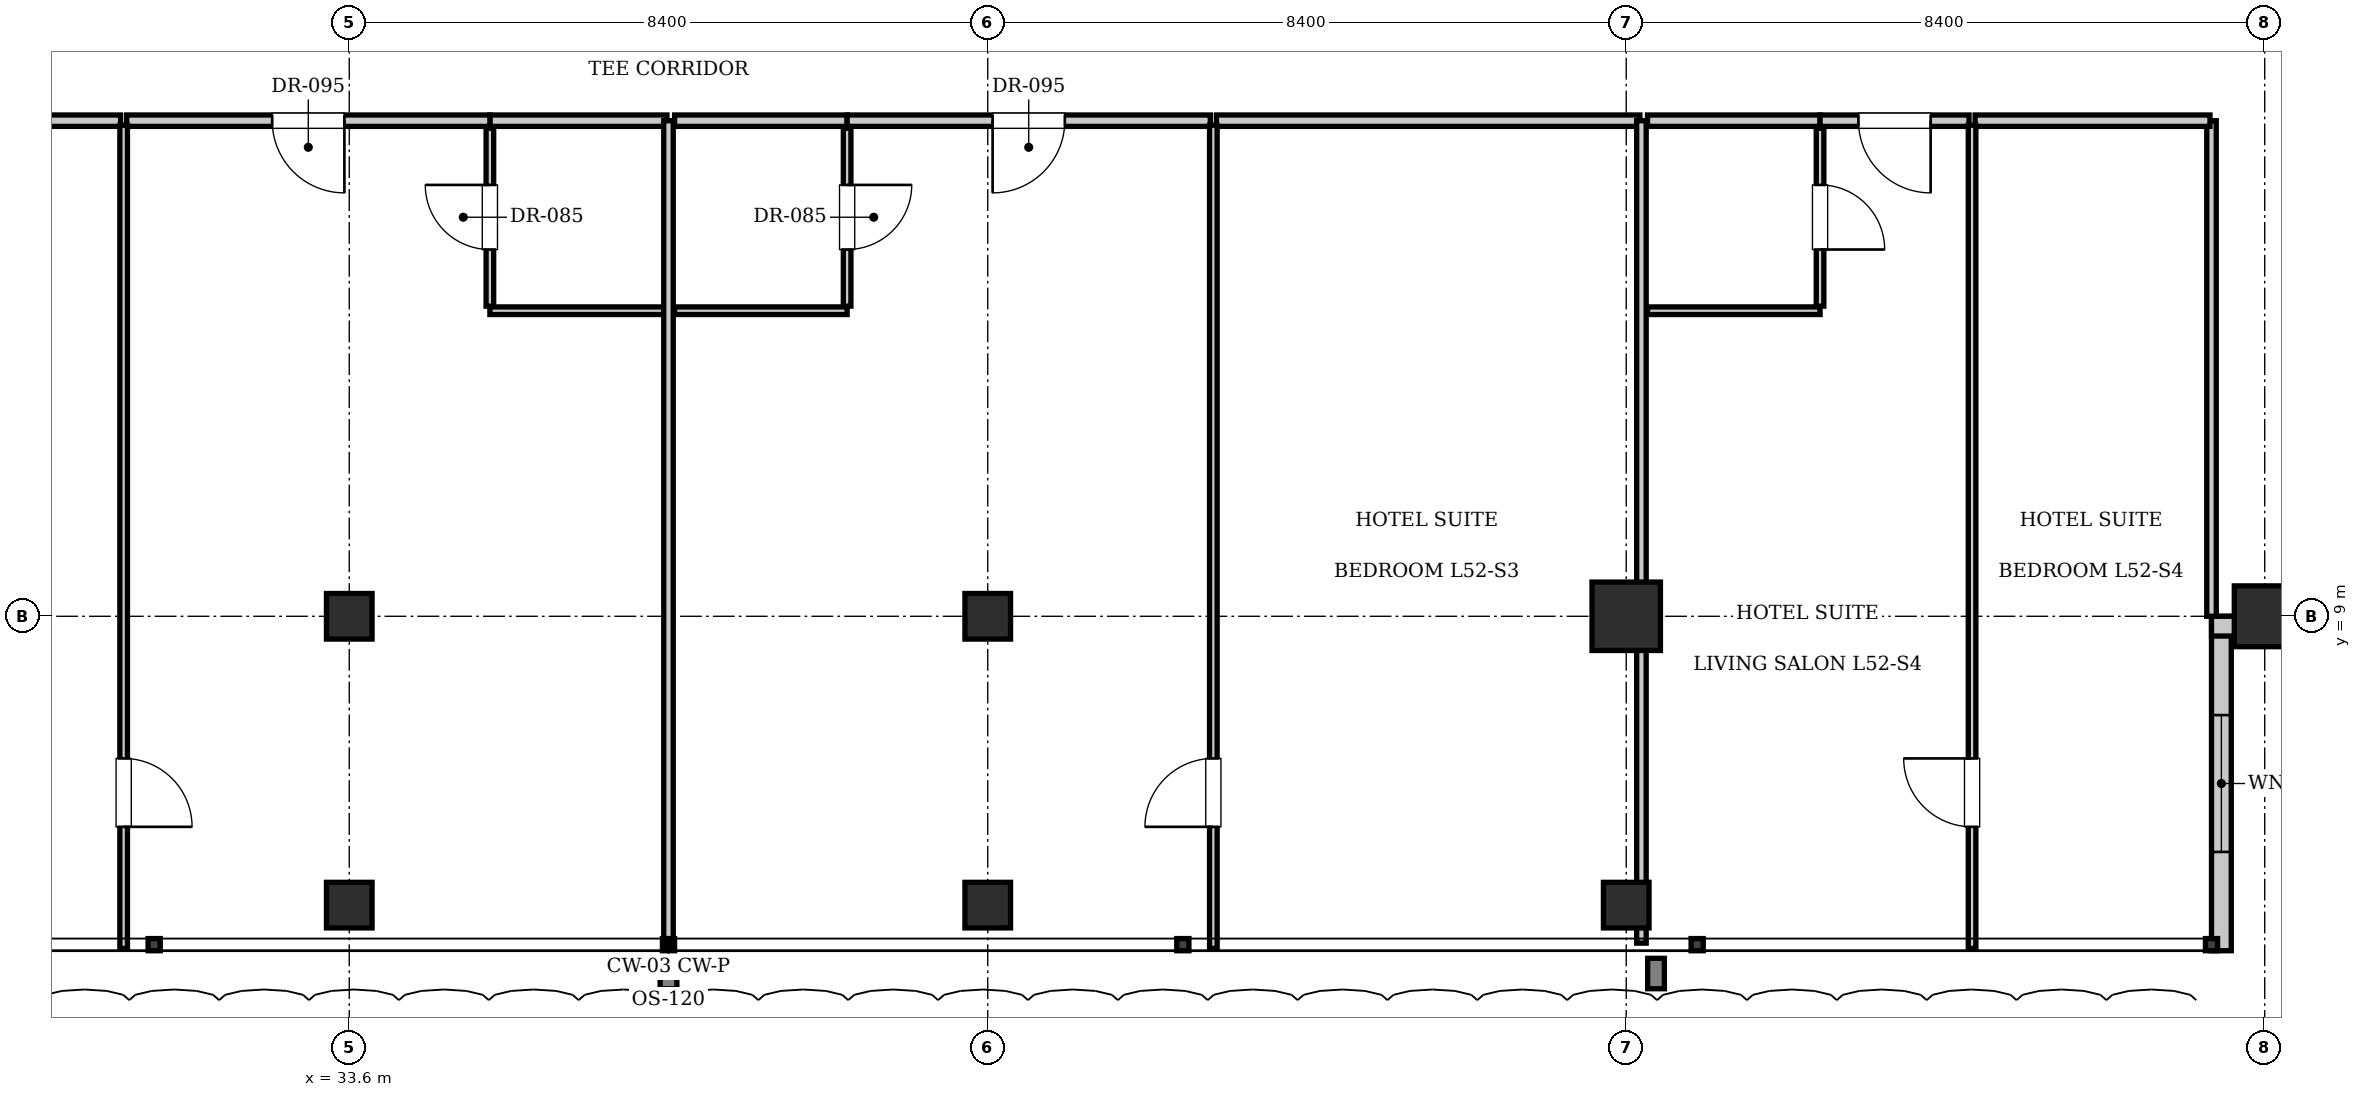
"""IFC4 building model, lengths in metres.
Left out: names, types, materials, properties, quantities, classifications, styles, units other than length and angle.
Written with IfcOpenShell. Run it as: python <this file> out.ifc"""

import sys

from ifc_helpers import new_model, si_unit, direction, frame, frame_2d, origin, origin_2d, place, context, subcontext, project, spatial, rectangle, i_section, extrude, element, fill, save


model = new_model("IFC4")
c1 = context("Model", 3, precision=1e-05, world=origin(), true_north=direction((0.0, 1.0)))
c2 = subcontext(c1, "Body", "Model", "MODEL_VIEW")
j1 = project(units=[si_unit("LENGTHUNIT", "METRE"), si_unit("PLANEANGLEUNIT", "RADIAN")], contexts=[c1])
p1 = place(None, origin())
s1 = spatial("IfcSite", under=j1, at=p1, CompositionType="ELEMENT")
p2 = place(p1, origin())
s2 = spatial("IfcBuilding", under=s1, at=p2, CompositionType="ELEMENT")
p3 = place(p2, frame((0.0, 0.0, 212.1)))
s3 = spatial("IfcBuildingStorey", under=s2, at=p3, CompositionType="ELEMENT", Elevation=212.1)
p4 = place(p3, frame((50.4, 9.0, 0.0), z_axis=(0.0, 0.0, 1.0), x_axis=(1.0, 0.0, 0.0)))
e1 = element("IfcColumn", 1, at=p4, inside=s3, PredefinedType="COLUMN", context=c2, shape_type="SweptSolid", body=[
    extrude(rectangle(XDim=0.9, YDim=0.9, at=origin_2d()), origin(), (0.0, 0.0, 1.0), 3.85),
])
for number, where, z_axis, x_axis in (
    (2, (33.6, 9.0, 0.0), (0.0, 0.0, 1.0), (1.0, 0.0, 0.0)),
    (3, (42.0, 9.0, 0.0), (0.0, 0.0, 1.0), (1.0, 0.0, 0.0)),
):
    element("IfcColumn", number, at=place(p3, frame(where, z_axis=z_axis, x_axis=x_axis)), inside=s3, PredefinedType="COLUMN", context=c2, shape_type="SweptSolid", body=[
        extrude(i_section(OverallWidth=0.6, OverallDepth=0.6, WebThickness=0.025, FlangeThickness=0.038, at=origin_2d()), origin(), (0.0, 0.0, 1.0), 3.85),
    ])
p5 = place(p3, frame((58.8, 9.0, 0.0), z_axis=(0.0, 0.0, 1.0), x_axis=(1.0, 0.0, 0.0)))
e4 = element("IfcColumn", 4, at=p5, inside=s3, PredefinedType="COLUMN", context=c2, shape_type="SweptSolid", body=[
    extrude(rectangle(XDim=0.8, YDim=0.8, at=origin_2d()), origin(), (0.0, 0.0, 1.0), 3.85),
])
for number, where, z_axis, x_axis in (
    (5, (33.6, 5.2, 0.0), (0.0, 0.0, 1.0), (1.0, 0.0, 0.0)),
    (6, (42.0, 5.2, 0.0), (0.0, 0.0, 1.0), (1.0, 0.0, 0.0)),
    (7, (50.4, 5.2, 0.0), (0.0, 0.0, 1.0), (1.0, 0.0, 0.0)),
):
    element("IfcColumn", number, at=place(p3, frame(where, z_axis=z_axis, x_axis=x_axis)), inside=s3, PredefinedType="COLUMN", context=c2, shape_type="SweptSolid", body=[
        extrude(i_section(OverallWidth=0.6, OverallDepth=0.6, WebThickness=0.025, FlangeThickness=0.038, at=origin_2d()), origin(), (0.0, 0.0, 1.0), 3.85),
    ])
p6 = place(p3, frame((58.23, 9.0, 0.0), z_axis=(0.0, 0.0, 1.0), x_axis=(0.0, -1.0, 0.0)))
e8 = element("IfcWall", 8, at=p6, inside=s3, PredefinedType="SOLIDWALL", context=c2, shape_type="SweptSolid", body=[
    extrude(rectangle(XDim=4.4, YDim=0.26, at=frame_2d((2.2, 0.0))), origin(), (0.0, 0.0, 1.0), 3.61),
])
p7 = place(p6, frame((1.3, 0.0, 0.9)))
e9 = element("IfcOpeningElement", 9, at=p7, cuts=e8, PredefinedType="OPENING", context=c2, shape_type="SweptSolid", body=[
    extrude(rectangle(XDim=1.8, YDim=2.1, at=frame_2d((0.9, 1.05))), frame((0.0, 0.14, 0.0), z_axis=(0.0, -1.0, 0.0), x_axis=(1.0, 0.0, 0.0)), (0.0, 0.0, 1.0), 0.28),
])
p8 = place(p3, frame((62.5, 8.87, 0.0), z_axis=(0.0, 0.0, 1.0), x_axis=(-1.0, 0.0, 0.0)))
e10 = element("IfcWall", 10, at=p8, inside=s3, PredefinedType="SOLIDWALL", context=c2, shape_type="SweptSolid", body=[
    extrude(rectangle(XDim=4.4, YDim=0.26, at=frame_2d((2.2, 0.0))), origin(), (0.0, 0.0, 1.0), 3.071),
])
p9 = place(p8, frame((1.3, 0.0, 0.9)))
e11 = element("IfcOpeningElement", 11, at=p9, cuts=e10, PredefinedType="OPENING", context=c2, shape_type="SweptSolid", body=[
    extrude(rectangle(XDim=1.8, YDim=2.1, at=frame_2d((0.9, 1.05))), frame((0.0, 0.14, 0.0), z_axis=(0.0, -1.0, 0.0), x_axis=(1.0, 0.0, 0.0)), (0.0, 0.0, 1.0), 0.28),
])
p10 = place(p3, frame((58.1, 9.0, 0.0), z_axis=(0.0, 0.0, 1.0), x_axis=(0.0, 1.0, 0.0)))
e12 = element("IfcWall", 12, at=p10, inside=s3, PredefinedType="PARTITIONING", context=c2, shape_type="SweptSolid", body=[
    extrude(rectangle(XDim=6.52, YDim=0.125, at=frame_2d((3.26, 0.0))), origin(), (0.0, 0.0, 1.0), 3.61),
])
p11 = place(p3, frame((35.45, 15.52, 0.0), z_axis=(0.0, 0.0, 1.0), x_axis=(1.0, 0.0, 0.0)))
e13 = element("IfcWall", 13, at=p11, inside=s3, PredefinedType="PARTITIONING", context=c2, shape_type="SweptSolid", body=[
    extrude(rectangle(XDim=2.33, YDim=0.15, at=frame_2d((1.165, 0.0))), origin(), (0.0, 0.0, 1.0), 3.61),
])
p12 = place(p3, frame((35.45, 13.02, 0.0), z_axis=(0.0, 0.0, 1.0), x_axis=(1.0, 0.0, 0.0)))
e14 = element("IfcWall", 14, at=p12, inside=s3, PredefinedType="PARTITIONING", context=c2, shape_type="SweptSolid", body=[
    extrude(rectangle(XDim=2.31, YDim=0.1, at=frame_2d((1.155, 0.0))), origin(), (0.0, 0.0, 1.0), 3.61),
])
p13 = place(p3, frame((35.45, 13.08, 0.0), z_axis=(0.0, 0.0, 1.0), x_axis=(0.0, 1.0, 0.0)))
e15 = element("IfcWall", 15, at=p13, inside=s3, PredefinedType="PARTITIONING", context=c2, shape_type="SweptSolid", body=[
    extrude(rectangle(XDim=2.34, YDim=0.1, at=frame_2d((1.17, 0.0))), origin(), (0.0, 0.0, 1.0), 3.61),
])
p14 = place(p13, frame((0.745, 0.0, 0.0)))
e16 = element("IfcOpeningElement", 16, at=p14, cuts=e15, PredefinedType="OPENING", context=c2, shape_type="SweptSolid", body=[
    extrude(rectangle(XDim=0.85, YDim=2.1, at=frame_2d((0.425, 1.05))), frame((0.0, 0.06, 0.0), z_axis=(0.0, -1.0, 0.0), x_axis=(1.0, 0.0, 0.0)), (0.0, 0.0, 1.0), 0.12),
])
p15 = place(p3, frame((25.02, 15.52, 0.0), z_axis=(0.0, 0.0, 1.0), x_axis=(1.0, 0.0, 0.0)))
e17 = element("IfcWall", 17, at=p15, inside=s3, PredefinedType="PARTITIONING", context=c2, shape_type="SweptSolid", body=[
    extrude(rectangle(XDim=5.572, YDim=0.15, at=frame_2d((2.786, 0.0))), origin(), (0.0, 0.0, 1.0), 3.61),
])
p16 = place(p3, frame((30.672, 15.52, 0.0), z_axis=(0.0, 0.0, 1.0), x_axis=(1.0, 0.0, 0.0)))
e18 = element("IfcWall", 18, at=p16, inside=s3, PredefinedType="PARTITIONING", context=c2, shape_type="SweptSolid", body=[
    extrude(rectangle(XDim=4.778, YDim=0.15, at=frame_2d((2.389, 0.0))), origin(), (0.0, 0.0, 1.0), 3.61),
])
p17 = place(p16, frame((1.914, 0.0, 0.0)))
e19 = element("IfcOpeningElement", 19, at=p17, cuts=e18, PredefinedType="OPENING", context=c2, shape_type="SweptSolid", body=[
    extrude(rectangle(XDim=0.95, YDim=2.15, at=frame_2d((0.475, 1.075))), frame((0.0, 0.085, 0.0), z_axis=(0.0, -1.0, 0.0), x_axis=(1.0, 0.0, 0.0)), (0.0, 0.0, 1.0), 0.17),
])
p18 = place(p3, frame((30.632, 4.63, 0.0), z_axis=(0.0, 0.0, 1.0), x_axis=(0.0, 1.0, 0.0)))
e20 = element("IfcWall", 20, at=p18, inside=s3, PredefinedType="PARTITIONING", context=c2, shape_type="SweptSolid", body=[
    extrude(rectangle(XDim=10.83, YDim=0.1, at=frame_2d((5.415, 0.0))), origin(), (0.0, 0.0, 1.0), 3.61),
])
p19 = place(p18, frame((1.6, 0.0, 0.0)))
e21 = element("IfcOpeningElement", 21, at=p19, cuts=e20, PredefinedType="OPENING", context=c2, shape_type="SweptSolid", body=[
    extrude(rectangle(XDim=0.9, YDim=2.1, at=frame_2d((0.45, 1.05))), frame((0.0, 0.06, 0.0), z_axis=(0.0, -1.0, 0.0), x_axis=(1.0, 0.0, 0.0)), (0.0, 0.0, 1.0), 0.12),
])
p20 = place(p3, frame((37.8, 4.7, 0.0), z_axis=(0.0, 0.0, 1.0), x_axis=(0.0, 1.0, 0.0)))
e22 = element("IfcWall", 22, at=p20, inside=s3, PredefinedType="PARTITIONING", context=c2, shape_type="SweptSolid", body=[
    extrude(rectangle(XDim=10.82, YDim=0.125, at=frame_2d((5.41, 0.0))), origin(), (0.0, 0.0, 1.0), 3.207),
])
p21 = place(p3, frame((37.88, 15.52, 0.0), z_axis=(0.0, 0.0, 1.0), x_axis=(1.0, 0.0, 0.0)))
e23 = element("IfcWall", 23, at=p21, inside=s3, PredefinedType="PARTITIONING", context=c2, shape_type="SweptSolid", body=[
    extrude(rectangle(XDim=2.27, YDim=0.15, at=frame_2d((1.135, 0.0))), origin(), (0.0, 0.0, 1.0), 3.61),
])
p22 = place(p3, frame((37.88, 13.02, 0.0), z_axis=(0.0, 0.0, 1.0), x_axis=(1.0, 0.0, 0.0)))
e24 = element("IfcWall", 24, at=p22, inside=s3, PredefinedType="PARTITIONING", context=c2, shape_type="SweptSolid", body=[
    extrude(rectangle(XDim=2.27, YDim=0.1, at=frame_2d((1.135, 0.0))), origin(), (0.0, 0.0, 1.0), 3.61),
])
p23 = place(p3, frame((40.15, 13.08, 0.0), z_axis=(0.0, 0.0, 1.0), x_axis=(0.0, 1.0, 0.0)))
e25 = element("IfcWall", 25, at=p23, inside=s3, PredefinedType="PARTITIONING", context=c2, shape_type="SweptSolid", body=[
    extrude(rectangle(XDim=2.34, YDim=0.1, at=frame_2d((1.17, 0.0))), origin(), (0.0, 0.0, 1.0), 3.61),
])
p24 = place(p23, frame((0.745, 0.0, 0.0)))
e26 = element("IfcOpeningElement", 26, at=p24, cuts=e25, PredefinedType="OPENING", context=c2, shape_type="SweptSolid", body=[
    extrude(rectangle(XDim=0.85, YDim=2.1, at=frame_2d((0.425, 1.05))), frame((0.0, 0.06, 0.0), z_axis=(0.0, -1.0, 0.0), x_axis=(1.0, 0.0, 0.0)), (0.0, 0.0, 1.0), 0.12),
])
p25 = place(p3, frame((40.15, 15.52, 0.0), z_axis=(0.0, 0.0, 1.0), x_axis=(1.0, 0.0, 0.0)))
e27 = element("IfcWall", 27, at=p25, inside=s3, PredefinedType="PARTITIONING", context=c2, shape_type="SweptSolid", body=[
    extrude(rectangle(XDim=4.778, YDim=0.15, at=frame_2d((2.389, 0.0))), origin(), (0.0, 0.0, 1.0), 3.61),
])
p26 = place(p25, frame((1.914, 0.0, 0.0)))
e28 = element("IfcOpeningElement", 28, at=p26, cuts=e27, PredefinedType="OPENING", context=c2, shape_type="SweptSolid", body=[
    extrude(rectangle(XDim=0.95, YDim=2.15, at=frame_2d((0.475, 1.075))), frame((0.0, 0.085, 0.0), z_axis=(0.0, -1.0, 0.0), x_axis=(1.0, 0.0, 0.0)), (0.0, 0.0, 1.0), 0.17),
])
p27 = place(p3, frame((45.008, 15.52, 0.0), z_axis=(0.0, 0.0, 1.0), x_axis=(1.0, 0.0, 0.0)))
e29 = element("IfcWall", 29, at=p27, inside=s3, PredefinedType="PARTITIONING", context=c2, shape_type="SweptSolid", body=[
    extrude(rectangle(XDim=5.572, YDim=0.15, at=frame_2d((2.786, 0.0))), origin(), (0.0, 0.0, 1.0), 3.61),
])
p28 = place(p3, frame((44.968, 4.63, 0.0), z_axis=(0.0, 0.0, 1.0), x_axis=(0.0, 1.0, 0.0)))
e30 = element("IfcWall", 30, at=p28, inside=s3, PredefinedType="PARTITIONING", context=c2, shape_type="SweptSolid", body=[
    extrude(rectangle(XDim=10.83, YDim=0.1, at=frame_2d((5.415, 0.0))), origin(), (0.0, 0.0, 1.0), 3.61),
])
p29 = place(p28, frame((1.6, 0.0, 0.0)))
e31 = element("IfcOpeningElement", 31, at=p29, cuts=e30, PredefinedType="OPENING", context=c2, shape_type="SweptSolid", body=[
    extrude(rectangle(XDim=0.9, YDim=2.1, at=frame_2d((0.45, 1.05))), frame((0.0, 0.06, 0.0), z_axis=(0.0, -1.0, 0.0), x_axis=(1.0, 0.0, 0.0)), (0.0, 0.0, 1.0), 0.12),
])
p30 = place(p3, frame((50.6, 4.7, 0.0), z_axis=(0.0, 0.0, 1.0), x_axis=(0.0, 1.0, 0.0)))
e32 = element("IfcWall", 32, at=p30, inside=s3, PredefinedType="PARTITIONING", context=c2, shape_type="SweptSolid", body=[
    extrude(rectangle(XDim=10.82, YDim=0.125, at=frame_2d((5.41, 0.0))), origin(), (0.0, 0.0, 1.0), 3.61),
])
p31 = place(p3, frame((50.68, 15.52, 0.0), z_axis=(0.0, 0.0, 1.0), x_axis=(1.0, 0.0, 0.0)))
e33 = element("IfcWall", 33, at=p31, inside=s3, PredefinedType="PARTITIONING", context=c2, shape_type="SweptSolid", body=[
    extrude(rectangle(XDim=2.27, YDim=0.15, at=frame_2d((1.135, 0.0))), origin(), (0.0, 0.0, 1.0), 3.61),
])
p32 = place(p3, frame((50.68, 13.02, 0.0), z_axis=(0.0, 0.0, 1.0), x_axis=(1.0, 0.0, 0.0)))
e34 = element("IfcWall", 34, at=p32, inside=s3, PredefinedType="PARTITIONING", context=c2, shape_type="SweptSolid", body=[
    extrude(rectangle(XDim=2.27, YDim=0.1, at=frame_2d((1.135, 0.0))), origin(), (0.0, 0.0, 1.0), 3.61),
])
p33 = place(p3, frame((52.95, 13.08, 0.0), z_axis=(0.0, 0.0, 1.0), x_axis=(0.0, 1.0, 0.0)))
e35 = element("IfcWall", 35, at=p33, inside=s3, PredefinedType="PARTITIONING", context=c2, shape_type="SweptSolid", body=[
    extrude(rectangle(XDim=2.34, YDim=0.1, at=frame_2d((1.17, 0.0))), origin(), (0.0, 0.0, 1.0), 3.61),
])
p34 = place(p33, frame((0.745, 0.0, 0.0)))
e36 = element("IfcOpeningElement", 36, at=p34, cuts=e35, PredefinedType="OPENING", context=c2, shape_type="SweptSolid", body=[
    extrude(rectangle(XDim=0.85, YDim=2.1, at=frame_2d((0.425, 1.05))), frame((0.0, 0.06, 0.0), z_axis=(0.0, -1.0, 0.0), x_axis=(1.0, 0.0, 0.0)), (0.0, 0.0, 1.0), 0.12),
])
p35 = place(p3, frame((52.95, 15.52, 0.0), z_axis=(0.0, 0.0, 1.0), x_axis=(1.0, 0.0, 0.0)))
e37 = element("IfcWall", 37, at=p35, inside=s3, PredefinedType="PARTITIONING", context=c2, shape_type="SweptSolid", body=[
    extrude(rectangle(XDim=1.96, YDim=0.15, at=frame_2d((0.98, 0.0))), origin(), (0.0, 0.0, 1.0), 3.61),
])
p36 = place(p35, frame((0.505, 0.0, 0.0)))
e38 = element("IfcOpeningElement", 38, at=p36, cuts=e37, PredefinedType="OPENING", context=c2, shape_type="SweptSolid", body=[
    extrude(rectangle(XDim=0.95, YDim=2.15, at=frame_2d((0.475, 1.075))), frame((0.0, 0.085, 0.0), z_axis=(0.0, -1.0, 0.0), x_axis=(1.0, 0.0, 0.0)), (0.0, 0.0, 1.0), 0.17),
])
p37 = place(p3, frame((54.99, 15.52, 0.0), z_axis=(0.0, 0.0, 1.0), x_axis=(1.0, 0.0, 0.0)))
e39 = element("IfcWall", 39, at=p37, inside=s3, PredefinedType="PARTITIONING", context=c2, shape_type="SweptSolid", body=[
    extrude(rectangle(XDim=3.09, YDim=0.15, at=frame_2d((1.545, 0.0))), origin(), (0.0, 0.0, 1.0), 3.61),
])
p38 = place(p3, frame((54.95, 4.63, 0.0), z_axis=(0.0, 0.0, 1.0), x_axis=(0.0, 1.0, 0.0)))
e40 = element("IfcWall", 40, at=p38, inside=s3, PredefinedType="PARTITIONING", context=c2, shape_type="SweptSolid", body=[
    extrude(rectangle(XDim=10.83, YDim=0.1, at=frame_2d((5.415, 0.0))), origin(), (0.0, 0.0, 1.0), 3.61),
])
p39 = place(p38, frame((1.6, 0.0, 0.0)))
e41 = element("IfcOpeningElement", 41, at=p39, cuts=e40, PredefinedType="OPENING", context=c2, shape_type="SweptSolid", body=[
    extrude(rectangle(XDim=0.9, YDim=2.1, at=frame_2d((0.45, 1.05))), frame((0.0, 0.06, 0.0), z_axis=(0.0, -1.0, 0.0), x_axis=(1.0, 0.0, 0.0)), (0.0, 0.0, 1.0), 0.12),
])
p40 = place(p7, origin())
e42 = element("IfcWindow", 42, at=p40, inside=s3, PartitioningType="SINGLE_PANEL", PredefinedType="WINDOW", context=c2, shape_type="SweptSolid", body=[
    extrude(rectangle(XDim=1.8, YDim=2.1, at=frame_2d((0.9, 1.05))), frame((0.0, 0.03, 0.0), z_axis=(0.0, -1.0, 0.0), x_axis=(1.0, 0.0, 0.0)), (0.0, 0.0, 1.0), 0.06),
])
fill(e9, e42)
p41 = place(p14, origin())
e43 = element("IfcDoor", 43, at=p41, inside=s3, OperationType="SINGLE_SWING_RIGHT", PredefinedType="DOOR", context=c2, shape_type="SweptSolid", body=[
    extrude(rectangle(XDim=0.85, YDim=2.1, at=frame_2d((0.425, 1.05))), frame((0.0, 0.025, 0.0), z_axis=(0.0, -1.0, 0.0), x_axis=(1.0, 0.0, 0.0)), (0.0, 0.0, 1.0), 0.05),
])
fill(e16, e43)
p42 = place(p17, frame((0.95, 0.0, 0.0), z_axis=(0.0, 0.0, 1.0), x_axis=(-1.0, 0.0, 0.0)))
e44 = element("IfcDoor", 44, at=p42, inside=s3, OperationType="SINGLE_SWING_LEFT", PredefinedType="DOOR", context=c2, shape_type="SweptSolid", body=[
    extrude(rectangle(XDim=0.95, YDim=2.15, at=frame_2d((0.475, 1.075))), frame((0.0, 0.025, 0.0), z_axis=(0.0, -1.0, 0.0), x_axis=(1.0, 0.0, 0.0)), (0.0, 0.0, 1.0), 0.05),
])
fill(e19, e44)
p43 = place(p19, frame((0.9, 0.0, 0.0), z_axis=(0.0, 0.0, 1.0), x_axis=(-1.0, 0.0, 0.0)))
e45 = element("IfcDoor", 45, at=p43, inside=s3, OperationType="SINGLE_SWING_RIGHT", PredefinedType="DOOR", context=c2, shape_type="SweptSolid", body=[
    extrude(rectangle(XDim=0.9, YDim=2.1, at=frame_2d((0.45, 1.05))), frame((0.0, 0.025, 0.0), z_axis=(0.0, -1.0, 0.0), x_axis=(1.0, 0.0, 0.0)), (0.0, 0.0, 1.0), 0.05),
])
fill(e21, e45)
p44 = place(p24, frame((0.85, 0.0, 0.0), z_axis=(0.0, 0.0, 1.0), x_axis=(-1.0, 0.0, 0.0)))
e46 = element("IfcDoor", 46, at=p44, inside=s3, OperationType="SINGLE_SWING_LEFT", PredefinedType="DOOR", context=c2, shape_type="SweptSolid", body=[
    extrude(rectangle(XDim=0.85, YDim=2.1, at=frame_2d((0.425, 1.05))), frame((0.0, 0.025, 0.0), z_axis=(0.0, -1.0, 0.0), x_axis=(1.0, 0.0, 0.0)), (0.0, 0.0, 1.0), 0.05),
])
fill(e26, e46)
p45 = place(p26, frame((0.95, 0.0, 0.0), z_axis=(0.0, 0.0, 1.0), x_axis=(-1.0, 0.0, 0.0)))
e47 = element("IfcDoor", 47, at=p45, inside=s3, OperationType="SINGLE_SWING_RIGHT", PredefinedType="DOOR", context=c2, shape_type="SweptSolid", body=[
    extrude(rectangle(XDim=0.95, YDim=2.15, at=frame_2d((0.475, 1.075))), frame((0.0, 0.025, 0.0), z_axis=(0.0, -1.0, 0.0), x_axis=(1.0, 0.0, 0.0)), (0.0, 0.0, 1.0), 0.05),
])
fill(e28, e47)
p46 = place(p29, origin())
e48 = element("IfcDoor", 48, at=p46, inside=s3, OperationType="SINGLE_SWING_LEFT", PredefinedType="DOOR", context=c2, shape_type="SweptSolid", body=[
    extrude(rectangle(XDim=0.9, YDim=2.1, at=frame_2d((0.45, 1.05))), frame((0.0, 0.025, 0.0), z_axis=(0.0, -1.0, 0.0), x_axis=(1.0, 0.0, 0.0)), (0.0, 0.0, 1.0), 0.05),
])
fill(e31, e48)
p47 = place(p34, frame((0.85, 0.0, 0.0), z_axis=(0.0, 0.0, 1.0), x_axis=(-1.0, 0.0, 0.0)))
e49 = element("IfcDoor", 49, at=p47, inside=s3, OperationType="SINGLE_SWING_RIGHT", PredefinedType="DOOR", context=c2, shape_type="SweptSolid", body=[
    extrude(rectangle(XDim=0.85, YDim=2.1, at=frame_2d((0.425, 1.05))), frame((0.0, 0.025, 0.0), z_axis=(0.0, -1.0, 0.0), x_axis=(1.0, 0.0, 0.0)), (0.0, 0.0, 1.0), 0.05),
])
fill(e36, e49)
p48 = place(p36, frame((0.95, 0.0, 0.0), z_axis=(0.0, 0.0, 1.0), x_axis=(-1.0, 0.0, 0.0)))
e50 = element("IfcDoor", 50, at=p48, inside=s3, OperationType="SINGLE_SWING_LEFT", PredefinedType="DOOR", context=c2, shape_type="SweptSolid", body=[
    extrude(rectangle(XDim=0.95, YDim=2.15, at=frame_2d((0.475, 1.075))), frame((0.0, 0.025, 0.0), z_axis=(0.0, -1.0, 0.0), x_axis=(1.0, 0.0, 0.0)), (0.0, 0.0, 1.0), 0.05),
])
fill(e38, e50)
p49 = place(p39, origin())
e51 = element("IfcDoor", 51, at=p49, inside=s3, OperationType="SINGLE_SWING_RIGHT", PredefinedType="DOOR", context=c2, shape_type="SweptSolid", body=[
    extrude(rectangle(XDim=0.9, YDim=2.1, at=frame_2d((0.45, 1.05))), frame((0.0, 0.025, 0.0), z_axis=(0.0, -1.0, 0.0), x_axis=(1.0, 0.0, 0.0)), (0.0, 0.0, 1.0), 0.05),
])
fill(e41, e51)
save(model, sys.argv[1])
